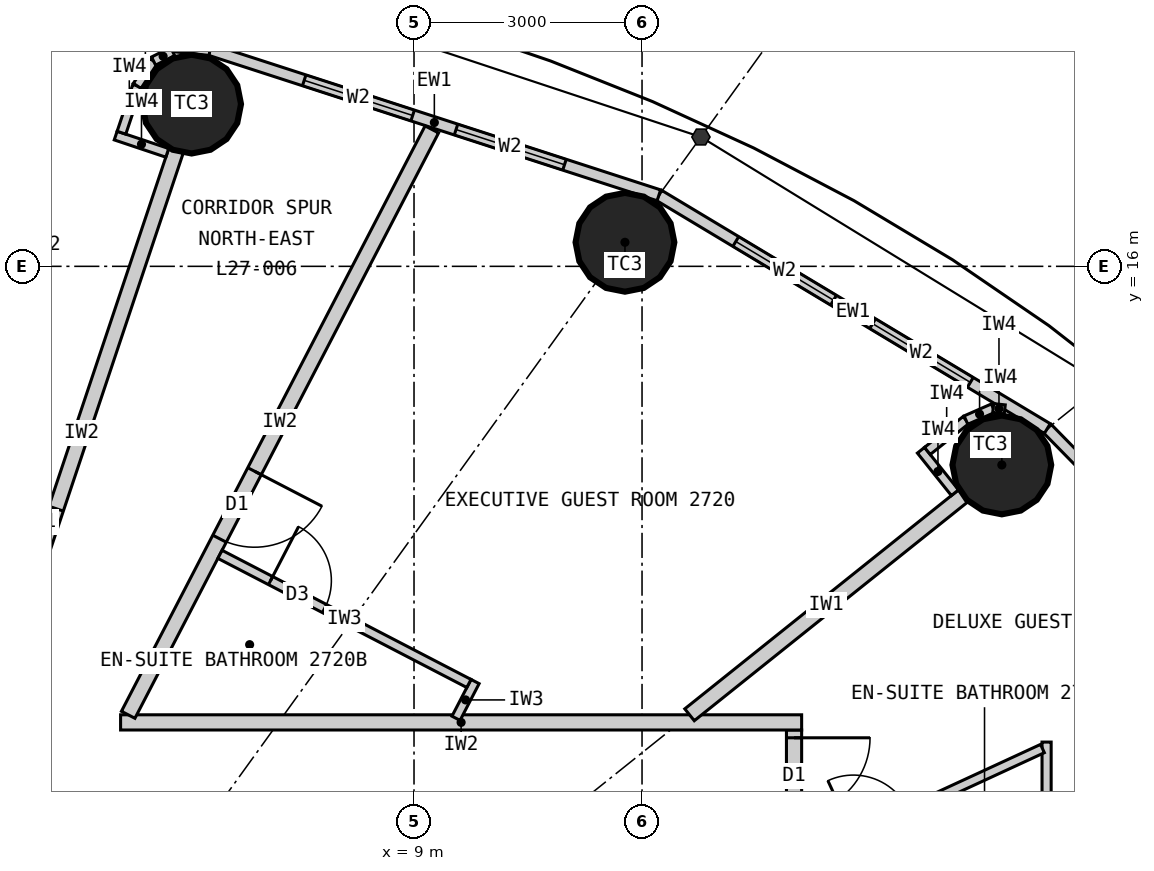
"""IFC4 building model, lengths in metres.
Left out: names, types, materials, properties, quantities, classifications, styles, units other than length and angle.
Written with IfcOpenShell. Run it as: python <this file> out.ifc"""

import sys

from ifc_helpers import new_model, si_unit, direction, frame, frame_2d, origin, origin_2d, place, context, subcontext, project, spatial, rectangle, circle, extrude, element, fill, save


model = new_model("IFC4")
c1 = context("Model", 3, precision=1e-05, world=origin(), true_north=direction((0.0, 1.0)))
c2 = subcontext(c1, "Body", "Model", "MODEL_VIEW")
j1 = project(units=[si_unit("LENGTHUNIT", "METRE"), si_unit("PLANEANGLEUNIT", "RADIAN")], contexts=[c1])
p1 = place(None, origin())
s1 = spatial("IfcSite", under=j1, at=p1, CompositionType="ELEMENT")
p2 = place(p1, origin())
s2 = spatial("IfcBuilding", under=s1, at=p2, CompositionType="ELEMENT")
p3 = place(p2, frame((0.0, 0.0, 108.9)))
s3 = spatial("IfcBuildingStorey", under=s2, at=p3, CompositionType="ELEMENT", Elevation=108.9)
for number, where, z_axis, x_axis in (
    (1, (16.734, 13.387, 0.0), (0.0, 0.0, 1.0), (1.0, 0.0, 0.0)),
    (2, (11.775, 16.316, 0.0), (0.0, 0.0, 1.0), (1.0, 0.0, 0.0)),
    (3, (6.074, 18.135, 0.0), (0.0, 0.0, 1.0), (1.0, 0.0, 0.0)),
):
    element("IfcColumn", number, at=place(p3, frame(where, z_axis=z_axis, x_axis=x_axis)), inside=s3, PredefinedType="COLUMN", context=c2, shape_type="SweptSolid", body=[
        extrude(circle(Radius=0.65, at=origin_2d()), origin(), (0.0, 0.0, 1.0), 3.3),
    ])
p4 = place(p3, frame((21.287, 9.832, 0.0), z_axis=(0.0, 0.0, 1.0), x_axis=(-0.700136650834, 0.714008872605, 0.0)))
e4 = element("IfcWall", 4, at=p4, inside=s3, PredefinedType="ELEMENTEDWALL", context=c2, shape_type="SweptSolid", body=[
    extrude(rectangle(XDim=5.649, YDim=0.15, at=frame_2d((2.825, 0.0))), origin(), (0.0, 0.0, 1.0), 3.12),
])
p5 = place(p4, frame((1.025, 0.0, 0.9)))
e5 = element("IfcOpeningElement", 5, at=p5, cuts=e4, PredefinedType="OPENING", context=c2, shape_type="SweptSolid", body=[
    extrude(rectangle(XDim=1.5, YDim=1.9, at=frame_2d((0.75, 0.95))), frame((0.0, 0.085, 0.0), z_axis=(0.0, -1.0, 0.0), x_axis=(1.0, 0.0, 0.0)), (0.0, 0.0, 1.0), 0.17),
])
p6 = place(p4, frame((3.125, 0.0, 0.9)))
e6 = element("IfcOpeningElement", 6, at=p6, cuts=e4, PredefinedType="OPENING", context=c2, shape_type="SweptSolid", body=[
    extrude(rectangle(XDim=1.5, YDim=1.9, at=frame_2d((0.75, 0.95))), frame((0.0, 0.085, 0.0), z_axis=(0.0, -1.0, 0.0), x_axis=(1.0, 0.0, 0.0)), (0.0, 0.0, 1.0), 0.17),
])
p7 = place(p3, frame((17.332, 13.866, 0.0), z_axis=(0.0, 0.0, 1.0), x_axis=(-0.857308573723, 0.514802884044, 0.0)))
e7 = element("IfcWall", 7, at=p7, inside=s3, PredefinedType="ELEMENTEDWALL", context=c2, shape_type="SweptSolid", body=[
    extrude(rectangle(XDim=5.961, YDim=0.15, at=frame_2d((2.98, 0.0))), origin(), (0.0, 0.0, 1.0), 3.12),
])
p8 = place(p7, frame((1.181, 0.0, 0.9)))
e8 = element("IfcOpeningElement", 8, at=p8, cuts=e7, PredefinedType="OPENING", context=c2, shape_type="SweptSolid", body=[
    extrude(rectangle(XDim=1.5, YDim=1.9, at=frame_2d((0.75, 0.95))), frame((0.0, 0.085, 0.0), z_axis=(0.0, -1.0, 0.0), x_axis=(1.0, 0.0, 0.0)), (0.0, 0.0, 1.0), 0.17),
])
p9 = place(p7, frame((3.281, 0.0, 0.9)))
e9 = element("IfcOpeningElement", 9, at=p9, cuts=e7, PredefinedType="OPENING", context=c2, shape_type="SweptSolid", body=[
    extrude(rectangle(XDim=1.5, YDim=1.9, at=frame_2d((0.75, 0.95))), frame((0.0, 0.085, 0.0), z_axis=(0.0, -1.0, 0.0), x_axis=(1.0, 0.0, 0.0)), (0.0, 0.0, 1.0), 0.17),
])
p10 = place(p3, frame((12.221, 16.935, 0.0), z_axis=(0.0, 0.0, 1.0), x_axis=(-0.951272691506, 0.308350881944, 0.0)))
e10 = element("IfcWall", 10, at=p10, inside=s3, PredefinedType="ELEMENTEDWALL", context=c2, shape_type="SweptSolid", body=[
    extrude(rectangle(XDim=6.211, YDim=0.15, at=frame_2d((3.105, 0.0))), origin(), (0.0, 0.0, 1.0), 3.12),
])
p11 = place(p10, frame((1.305, 0.0, 0.9)))
e11 = element("IfcOpeningElement", 11, at=p11, cuts=e10, PredefinedType="OPENING", context=c2, shape_type="SweptSolid", body=[
    extrude(rectangle(XDim=1.5, YDim=1.9, at=frame_2d((0.75, 0.95))), frame((0.0, 0.085, 0.0), z_axis=(0.0, -1.0, 0.0), x_axis=(1.0, 0.0, 0.0)), (0.0, 0.0, 1.0), 0.17),
])
p12 = place(p10, frame((3.405, 0.0, 0.9)))
e12 = element("IfcOpeningElement", 12, at=p12, cuts=e10, PredefinedType="OPENING", context=c2, shape_type="SweptSolid", body=[
    extrude(rectangle(XDim=1.5, YDim=1.9, at=frame_2d((0.75, 0.95))), frame((0.0, 0.085, 0.0), z_axis=(0.0, -1.0, 0.0), x_axis=(1.0, 0.0, 0.0)), (0.0, 0.0, 1.0), 0.17),
])
p13 = place(p3, frame((6.313, 18.85, 0.0), z_axis=(0.0, 0.0, 1.0), x_axis=(-0.994735690163, 0.102473931887, 0.0)))
e13 = element("IfcWall", 13, at=p13, inside=s3, PredefinedType="ELEMENTEDWALL", context=c2, shape_type="SweptSolid", body=[
    extrude(rectangle(XDim=6.347, YDim=0.15, at=frame_2d((3.173, 0.0))), origin(), (0.0, 0.0, 1.0), 3.12),
])
p14 = place(p13, frame((1.373, 0.0, 0.9)))
e14 = element("IfcOpeningElement", 14, at=p14, cuts=e13, PredefinedType="OPENING", context=c2, shape_type="SweptSolid", body=[
    extrude(rectangle(XDim=1.5, YDim=1.9, at=frame_2d((0.75, 0.95))), frame((0.0, 0.085, 0.0), z_axis=(0.0, -1.0, 0.0), x_axis=(1.0, 0.0, 0.0)), (0.0, 0.0, 1.0), 0.17),
])
p15 = place(p13, frame((3.473, 0.0, 0.9)))
e15 = element("IfcOpeningElement", 15, at=p15, cuts=e13, PredefinedType="OPENING", context=c2, shape_type="SweptSolid", body=[
    extrude(rectangle(XDim=1.5, YDim=1.9, at=frame_2d((0.75, 0.95))), frame((0.0, 0.085, 0.0), z_axis=(0.0, -1.0, 0.0), x_axis=(1.0, 0.0, 0.0)), (0.0, 0.0, 1.0), 0.17),
])
p16 = place(p3, frame((14.0, -9.9, 0.0), z_axis=(0.0, 0.0, 1.0), x_axis=(0.0, 1.0, 0.0)))
e16 = element("IfcWall", 16, at=p16, inside=s3, PredefinedType="PARTITIONING", context=c2, shape_type="SweptSolid", body=[
    extrude(rectangle(XDim=19.8, YDim=0.2, at=frame_2d((9.9, 0.0))), origin(), (0.0, 0.0, 1.0), 3.12),
])
p17 = place(p16, frame((3.318, 0.0, 0.0)))
e17 = element("IfcOpeningElement", 17, at=p17, cuts=e16, PredefinedType="OPENING", context=c2, shape_type="SweptSolid", body=[
    extrude(rectangle(XDim=1.0, YDim=2.2, at=frame_2d((0.5, 1.1))), frame((0.0, 0.11, 0.0), z_axis=(0.0, -1.0, 0.0), x_axis=(1.0, 0.0, 0.0)), (0.0, 0.0, 1.0), 0.22),
])
p18 = place(p16, frame((9.238, 0.0, 0.0)))
e18 = element("IfcOpeningElement", 18, at=p18, cuts=e16, PredefinedType="OPENING", context=c2, shape_type="SweptSolid", body=[
    extrude(rectangle(XDim=1.0, YDim=2.2, at=frame_2d((0.5, 1.1))), frame((0.0, 0.11, 0.0), z_axis=(0.0, -1.0, 0.0), x_axis=(1.0, 0.0, 0.0)), (0.0, 0.0, 1.0), 0.22),
])
p19 = place(p16, frame((13.742, 0.0, 0.0)))
e19 = element("IfcOpeningElement", 19, at=p19, cuts=e16, PredefinedType="OPENING", context=c2, shape_type="SweptSolid", body=[
    extrude(rectangle(XDim=1.0, YDim=2.2, at=frame_2d((0.5, 1.1))), frame((0.0, 0.11, 0.0), z_axis=(0.0, -1.0, 0.0), x_axis=(1.0, 0.0, 0.0)), (0.0, 0.0, 1.0), 0.22),
])
p20 = place(p16, frame((18.698, 0.0, 0.0)))
e20 = element("IfcOpeningElement", 20, at=p20, cuts=e16, PredefinedType="OPENING", context=c2, shape_type="SweptSolid", body=[
    extrude(rectangle(XDim=1.0, YDim=2.2, at=frame_2d((0.5, 1.1))), frame((0.0, 0.11, 0.0), z_axis=(0.0, -1.0, 0.0), x_axis=(1.0, 0.0, 0.0)), (0.0, 0.0, 1.0), 0.22),
])
p21 = place(p3, frame((5.139, 10.0, 0.0), z_axis=(0.0, 0.0, 1.0), x_axis=(1.0, 0.0, 0.0)))
e21 = element("IfcWall", 21, at=p21, inside=s3, PredefinedType="PARTITIONING", context=c2, shape_type="SweptSolid", body=[
    extrude(rectangle(XDim=8.961, YDim=0.2, at=frame_2d((4.48, 0.0))), origin(), (0.0, 0.0, 1.0), 3.12),
])
p22 = place(p3, frame((14.1, 6.512, 0.0), z_axis=(0.0, 0.0, 1.0), x_axis=(0.907833019998, 0.419331858797, 0.0)))
e22 = element("IfcWall", 22, at=p22, inside=s3, PredefinedType="PARTITIONING", context=c2, shape_type="SweptSolid", body=[
    extrude(rectangle(XDim=6.505, YDim=0.2, at=frame_2d((3.252, 0.0))), origin(), (0.0, 0.0, 1.0), 2.27),
])
p23 = place(p3, frame((12.625, 10.1, 0.0), z_axis=(0.0, 0.0, 1.0), x_axis=(0.780863644897, 0.624701503182, 0.0)))
e23 = element("IfcWall", 23, at=p23, inside=s3, PredefinedType="PARTITIONING", context=c2, shape_type="SweptSolid", body=[
    extrude(rectangle(XDim=4.612, YDim=0.2, at=frame_2d((2.306, 0.0))), origin(), (0.0, 0.0, 1.0), 2.37),
])
p24 = place(p3, frame((5.239, 10.1, 0.0), z_axis=(0.0, 0.0, 1.0), x_axis=(0.4604797896, 0.887670188398, 0.0)))
e24 = element("IfcWall", 24, at=p24, inside=s3, PredefinedType="PARTITIONING", context=c2, shape_type="SweptSolid", body=[
    extrude(rectangle(XDim=8.676, YDim=0.2, at=frame_2d((4.338, 0.0))), origin(), (0.0, 0.0, 1.0), 3.12),
])
p25 = place(p24, frame((2.61, 0.0, 0.0)))
e25 = element("IfcOpeningElement", 25, at=p25, cuts=e24, PredefinedType="OPENING", context=c2, shape_type="SweptSolid", body=[
    extrude(rectangle(XDim=1.0, YDim=2.2, at=frame_2d((0.5, 1.1))), frame((0.0, 0.11, 0.0), z_axis=(0.0, -1.0, 0.0), x_axis=(1.0, 0.0, 0.0)), (0.0, 0.0, 1.0), 0.22),
])
p26 = place(p3, frame((3.383, 10.1, 0.0), z_axis=(0.0, 0.0, 1.0), x_axis=(0.317603705574, 0.948223542318, 0.0)))
e26 = element("IfcWall", 26, at=p26, inside=s3, PredefinedType="PARTITIONING", context=c2, shape_type="SweptSolid", body=[
    extrude(rectangle(XDim=7.823, YDim=0.2, at=frame_2d((3.912, 0.0))), origin(), (0.0, 0.0, 1.0), 2.37),
])
p27 = place(p26, frame((1.86, 0.0, 0.0)))
e27 = element("IfcOpeningElement", 27, at=p27, cuts=e26, PredefinedType="OPENING", context=c2, shape_type="SweptSolid", body=[
    extrude(rectangle(XDim=1.0, YDim=2.2, at=frame_2d((0.5, 1.1))), frame((0.0, 0.11, 0.0), z_axis=(0.0, -1.0, 0.0), x_axis=(1.0, 0.0, 0.0)), (0.0, 0.0, 1.0), 0.22),
])
p28 = place(p3, frame((17.323, 8.101, 0.0), z_axis=(0.0, 0.0, 1.0), x_axis=(0.0, 1.0, 0.0)))
e28 = element("IfcWall", 28, at=p28, inside=s3, PredefinedType="PARTITIONING", context=c2, shape_type="SweptSolid", body=[
    extrude(rectangle(XDim=1.64, YDim=0.12, at=frame_2d((0.82, 0.0))), origin(), (0.0, 0.0, 1.0), 3.12),
])
p29 = place(p3, frame((14.1, 8.193, 0.0), z_axis=(0.0, 0.0, 1.0), x_axis=(0.907836493557, 0.419324338628, 0.0)))
e29 = element("IfcWall", 29, at=p29, inside=s3, PredefinedType="PARTITIONING", context=c2, shape_type="SweptSolid", body=[
    extrude(rectangle(XDim=3.49, YDim=0.12, at=frame_2d((1.745, 0.0))), origin(), (0.0, 0.0, 1.0), 3.12),
])
p30 = place(p29, frame((0.75, 0.0, 0.0)))
e30 = element("IfcOpeningElement", 30, at=p30, cuts=e29, PredefinedType="OPENING", context=c2, shape_type="SweptSolid", body=[
    extrude(rectangle(XDim=0.8, YDim=2.1, at=frame_2d((0.4, 1.05))), frame((0.0, 0.07, 0.0), z_axis=(0.0, -1.0, 0.0), x_axis=(1.0, 0.0, 0.0)), (0.0, 0.0, 1.0), 0.14),
])
p31 = place(p3, frame((9.552, 10.054, 0.0), z_axis=(0.0, 0.0, 1.0), x_axis=(0.460604866949, 0.887605293215, 0.0)))
e31 = element("IfcWall", 31, at=p31, inside=s3, PredefinedType="PARTITIONING", context=c2, shape_type="SweptSolid", body=[
    extrude(rectangle(XDim=0.545, YDim=0.12, at=frame_2d((0.272, 0.0))), origin(), (0.0, 0.0, 1.0), 3.12),
])
p32 = place(p3, frame((6.447, 12.211, 0.0), z_axis=(0.0, 0.0, 1.0), x_axis=(0.887685422499, -0.460450421525, 0.0)))
e32 = element("IfcWall", 32, at=p32, inside=s3, PredefinedType="PARTITIONING", context=c2, shape_type="SweptSolid", body=[
    extrude(rectangle(XDim=3.69, YDim=0.12, at=frame_2d((1.845, 0.0))), origin(), (0.0, 0.0, 1.0), 3.12),
])
p33 = place(p32, frame((0.75, 0.0, 0.0)))
e33 = element("IfcOpeningElement", 33, at=p33, cuts=e32, PredefinedType="OPENING", context=c2, shape_type="SweptSolid", body=[
    extrude(rectangle(XDim=0.8, YDim=2.1, at=frame_2d((0.4, 1.05))), frame((0.0, 0.07, 0.0), z_axis=(0.0, -1.0, 0.0), x_axis=(1.0, 0.0, 0.0)), (0.0, 0.0, 1.0), 0.14),
])
p34 = place(p3, frame((16.117, 13.022, 0.0), z_axis=(0.0, 0.0, 1.0), x_axis=(-0.62465344249, 0.780902091677, 0.0)))
e34 = element("IfcWall", 34, at=p34, inside=s3, PredefinedType="PARTITIONING", context=c2, shape_type="SweptSolid", body=[
    extrude(rectangle(XDim=0.716, YDim=0.12, at=frame_2d((0.358, 0.0))), origin(), (0.0, 0.0, 1.0), 3.12),
])
p35 = place(p3, frame((15.754, 13.571, 0.0), z_axis=(0.0, 0.0, 1.0), x_axis=(0.780905453553, 0.624649239663, 0.0)))
e35 = element("IfcWall", 35, at=p35, inside=s3, PredefinedType="PARTITIONING", context=c2, shape_type="SweptSolid", body=[
    extrude(rectangle(XDim=0.65, YDim=0.12, at=frame_2d((0.325, 0.0))), origin(), (0.0, 0.0, 1.0), 3.12),
])
p36 = place(p3, frame((16.262, 13.977, 0.0), z_axis=(0.0, 0.0, 1.0), x_axis=(0.915985403703, 0.401211590314, 0.0)))
e36 = element("IfcWall", 36, at=p36, inside=s3, PredefinedType="PARTITIONING", context=c2, shape_type="SweptSolid", body=[
    extrude(rectangle(XDim=0.391, YDim=0.12, at=frame_2d((0.196, 0.0))), origin(), (0.0, 0.0, 1.0), 3.12),
])
p37 = place(p3, frame((16.62, 14.134, 0.0), z_axis=(0.0, 0.0, 1.0), x_axis=(0.993941871493, -0.109907033867, 0.0)))
e37 = element("IfcWall", 37, at=p37, inside=s3, PredefinedType="PARTITIONING", context=c2, shape_type="SweptSolid", body=[
    extrude(rectangle(XDim=0.153, YDim=0.12, at=frame_2d((0.077, 0.0))), origin(), (0.0, 0.0, 1.0), 3.12),
])
p38 = place(p3, frame((5.754, 17.493, 0.0), z_axis=(0.0, 0.0, 1.0), x_axis=(-0.9482389443, 0.317557718397, 0.0)))
e38 = element("IfcWall", 38, at=p38, inside=s3, PredefinedType="PARTITIONING", context=c2, shape_type="SweptSolid", body=[
    extrude(rectangle(XDim=0.716, YDim=0.12, at=frame_2d((0.358, 0.0))), origin(), (0.0, 0.0, 1.0), 3.12),
])
p39 = place(p3, frame((5.151, 17.758, 0.0), z_axis=(0.0, 0.0, 1.0), x_axis=(0.317354244456, 0.948307061835, 0.0)))
e39 = element("IfcWall", 39, at=p39, inside=s3, PredefinedType="PARTITIONING", context=c2, shape_type="SweptSolid", body=[
    extrude(rectangle(XDim=0.65, YDim=0.12, at=frame_2d((0.325, 0.0))), origin(), (0.0, 0.0, 1.0), 3.12),
])
p40 = place(p3, frame((5.357, 18.375, 0.0), z_axis=(0.0, 0.0, 1.0), x_axis=(0.552249752128, 0.833678721856, 0.0)))
e40 = element("IfcWall", 40, at=p40, inside=s3, PredefinedType="PARTITIONING", context=c2, shape_type="SweptSolid", body=[
    extrude(rectangle(XDim=0.391, YDim=0.12, at=frame_2d((0.196, 0.0))), origin(), (0.0, 0.0, 1.0), 3.12),
])
p41 = place(p3, frame((5.573, 18.701, 0.0), z_axis=(0.0, 0.0, 1.0), x_axis=(0.895295561985, 0.445472621707, 0.0)))
e41 = element("IfcWall", 41, at=p41, inside=s3, PredefinedType="PARTITIONING", context=c2, shape_type="SweptSolid", body=[
    extrude(rectangle(XDim=0.281, YDim=0.12, at=frame_2d((0.14, 0.0))), origin(), (0.0, 0.0, 1.0), 3.12),
])
p42 = place(p8, origin())
e42 = element("IfcWindow", 42, at=p42, inside=s3, PartitioningType="SINGLE_PANEL", PredefinedType="WINDOW", context=c2, shape_type="SweptSolid", body=[
    extrude(rectangle(XDim=1.5, YDim=1.9, at=frame_2d((0.75, 0.95))), frame((0.0, 0.03, 0.0), z_axis=(0.0, -1.0, 0.0), x_axis=(1.0, 0.0, 0.0)), (0.0, 0.0, 1.0), 0.06),
])
fill(e8, e42)
p43 = place(p9, origin())
e43 = element("IfcWindow", 43, at=p43, inside=s3, PartitioningType="SINGLE_PANEL", PredefinedType="WINDOW", context=c2, shape_type="SweptSolid", body=[
    extrude(rectangle(XDim=1.5, YDim=1.9, at=frame_2d((0.75, 0.95))), frame((0.0, 0.03, 0.0), z_axis=(0.0, -1.0, 0.0), x_axis=(1.0, 0.0, 0.0)), (0.0, 0.0, 1.0), 0.06),
])
fill(e9, e43)
p44 = place(p11, origin())
e44 = element("IfcWindow", 44, at=p44, inside=s3, PartitioningType="SINGLE_PANEL", PredefinedType="WINDOW", context=c2, shape_type="SweptSolid", body=[
    extrude(rectangle(XDim=1.5, YDim=1.9, at=frame_2d((0.75, 0.95))), frame((0.0, 0.03, 0.0), z_axis=(0.0, -1.0, 0.0), x_axis=(1.0, 0.0, 0.0)), (0.0, 0.0, 1.0), 0.06),
])
fill(e11, e44)
p45 = place(p12, origin())
e45 = element("IfcWindow", 45, at=p45, inside=s3, PartitioningType="SINGLE_PANEL", PredefinedType="WINDOW", context=c2, shape_type="SweptSolid", body=[
    extrude(rectangle(XDim=1.5, YDim=1.9, at=frame_2d((0.75, 0.95))), frame((0.0, 0.03, 0.0), z_axis=(0.0, -1.0, 0.0), x_axis=(1.0, 0.0, 0.0)), (0.0, 0.0, 1.0), 0.06),
])
fill(e12, e45)
p46 = place(p27, origin())
e46 = element("IfcDoor", 46, at=p46, inside=s3, OperationType="SINGLE_SWING_LEFT", PredefinedType="DOOR", context=c2, shape_type="SweptSolid", body=[
    extrude(rectangle(XDim=1.0, YDim=2.2, at=frame_2d((0.5, 1.1))), frame((0.0, 0.025, 0.0), z_axis=(0.0, -1.0, 0.0), x_axis=(1.0, 0.0, 0.0)), (0.0, 0.0, 1.0), 0.05),
])
fill(e27, e46)
p47 = place(p20, origin())
e47 = element("IfcDoor", 47, at=p47, inside=s3, OperationType="SINGLE_SWING_RIGHT", PredefinedType="DOOR", context=c2, shape_type="SweptSolid", body=[
    extrude(rectangle(XDim=1.0, YDim=2.2, at=frame_2d((0.5, 1.1))), frame((0.0, 0.025, 0.0), z_axis=(0.0, -1.0, 0.0), x_axis=(1.0, 0.0, 0.0)), (0.0, 0.0, 1.0), 0.05),
])
fill(e20, e47)
p48 = place(p33, origin())
e48 = element("IfcDoor", 48, at=p48, inside=s3, OperationType="SINGLE_SWING_LEFT", PredefinedType="DOOR", context=c2, shape_type="SweptSolid", body=[
    extrude(rectangle(XDim=0.8, YDim=2.1, at=frame_2d((0.4, 1.05))), frame((0.0, 0.025, 0.0), z_axis=(0.0, -1.0, 0.0), x_axis=(1.0, 0.0, 0.0)), (0.0, 0.0, 1.0), 0.05),
])
fill(e33, e48)
p49 = place(p25, origin())
e49 = element("IfcDoor", 49, at=p49, inside=s3, OperationType="SINGLE_SWING_RIGHT", PredefinedType="DOOR", context=c2, shape_type="SweptSolid", body=[
    extrude(rectangle(XDim=1.0, YDim=2.2, at=frame_2d((0.5, 1.1))), frame((0.0, 0.025, 0.0), z_axis=(0.0, -1.0, 0.0), x_axis=(1.0, 0.0, 0.0)), (0.0, 0.0, 1.0), 0.05),
])
fill(e25, e49)
save(model, sys.argv[1])
